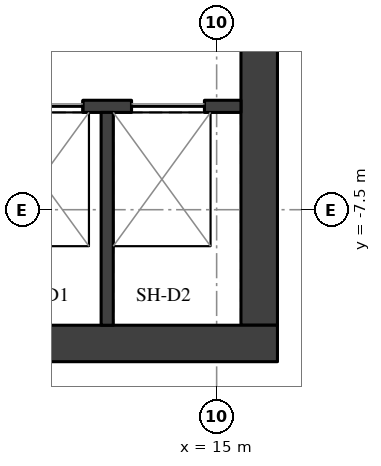
"""IFC4 building model, lengths in metres.
Left out: names, types, materials, properties, quantities, classifications, styles, units other than length and angle.
Written with IfcOpenShell. Run it as: python <this file> out.ifc"""

import sys

from ifc_helpers import new_model, si_unit, direction, frame, frame_2d, origin, place, context, subcontext, project, spatial, rectangle, extrude, element, fill, save


model = new_model("IFC4")
c1 = context("Model", 3, precision=1e-05, world=origin(), true_north=direction((0.0, 1.0)))
c2 = subcontext(c1, "Body", "Model", "MODEL_VIEW")
j1 = project(units=[si_unit("LENGTHUNIT", "METRE"), si_unit("PLANEANGLEUNIT", "RADIAN")], contexts=[c1])
p1 = place(None, origin())
s1 = spatial("IfcSite", under=j1, at=p1, CompositionType="ELEMENT")
p2 = place(p1, origin())
s2 = spatial("IfcBuilding", under=s1, at=p2, CompositionType="ELEMENT")
p3 = place(p2, frame((0.0, 0.0, 264.2)))
s3 = spatial("IfcBuildingStorey", under=s2, at=p3, CompositionType="ELEMENT", Elevation=264.2)
p4 = place(p3, frame((15.7, -9.4, 0.0), z_axis=(0.0, 0.0, 1.0), x_axis=(0.0, 1.0, 0.0)))
e1 = element("IfcWall", 1, at=p4, inside=s3, PredefinedType="SHEAR", context=c2, shape_type="SweptSolid", body=[
    extrude(rectangle(XDim=18.8, YDim=0.6, at=frame_2d((9.4, 0.0))), origin(), (0.0, 0.0, 1.0), 4.59),
])
p5 = place(p3, frame((4.0, -9.7, 0.0), z_axis=(0.0, 0.0, 1.0), x_axis=(1.0, 0.0, 0.0)))
e2 = element("IfcWall", 2, at=p5, inside=s3, PredefinedType="SHEAR", context=c2, shape_type="SweptSolid", body=[
    extrude(rectangle(XDim=12.0, YDim=0.6, at=frame_2d((6.0, 0.0))), origin(), (0.0, 0.0, 1.0), 4.59),
])
p6 = place(p3, frame((4.6, -5.8, 0.0), z_axis=(0.0, 0.0, 1.0), x_axis=(1.0, 0.0, 0.0)))
e3 = element("IfcWall", 3, at=p6, inside=s3, PredefinedType="SHEAR", context=c2, shape_type="SweptSolid", body=[
    extrude(rectangle(XDim=10.8, YDim=0.2, at=frame_2d((5.4, 0.0))), origin(), (0.0, 0.0, 1.0), 4.59),
])
p7 = place(p6, frame((7.0, 0.0, 0.0)))
e4 = element("IfcOpeningElement", 4, at=p7, cuts=e3, PredefinedType="OPENING", context=c2, shape_type="SweptSolid", body=[
    extrude(rectangle(XDim=1.2, YDim=2.1, at=frame_2d((0.6, 1.05))), frame((0.0, 0.11, 0.0), z_axis=(0.0, -1.0, 0.0), x_axis=(1.0, 0.0, 0.0)), (0.0, 0.0, 1.0), 0.22),
])
p8 = place(p6, frame((9.0, 0.0, 0.0)))
e5 = element("IfcOpeningElement", 5, at=p8, cuts=e3, PredefinedType="OPENING", context=c2, shape_type="SweptSolid", body=[
    extrude(rectangle(XDim=1.2, YDim=2.1, at=frame_2d((0.6, 1.05))), frame((0.0, 0.11, 0.0), z_axis=(0.0, -1.0, 0.0), x_axis=(1.0, 0.0, 0.0)), (0.0, 0.0, 1.0), 0.22),
])
p9 = place(p3, frame((13.2, -9.4, 0.0), z_axis=(0.0, 0.0, 1.0), x_axis=(0.0, 1.0, 0.0)))
e6 = element("IfcWall", 6, at=p9, inside=s3, PredefinedType="SHEAR", context=c2, shape_type="SweptSolid", body=[
    extrude(rectangle(XDim=3.5, YDim=0.2, at=frame_2d((1.75, 0.0))), origin(), (0.0, 0.0, 1.0), 4.59),
])
p10 = place(p7, origin())
e7 = element("IfcDoor", 7, at=p10, inside=s3, OperationType="DOUBLE_DOOR_SLIDING", PredefinedType="DOOR", context=c2, shape_type="SweptSolid", body=[
    extrude(rectangle(XDim=1.2, YDim=2.1, at=frame_2d((0.6, 1.05))), frame((0.0, 0.025, 0.0), z_axis=(0.0, -1.0, 0.0), x_axis=(1.0, 0.0, 0.0)), (0.0, 0.0, 1.0), 0.05),
])
fill(e4, e7)
p11 = place(p8, origin())
e8 = element("IfcDoor", 8, at=p11, inside=s3, OperationType="DOUBLE_DOOR_SLIDING", PredefinedType="DOOR", context=c2, shape_type="SweptSolid", body=[
    extrude(rectangle(XDim=1.2, YDim=2.1, at=frame_2d((0.6, 1.05))), frame((0.0, 0.025, 0.0), z_axis=(0.0, -1.0, 0.0), x_axis=(1.0, 0.0, 0.0)), (0.0, 0.0, 1.0), 0.05),
])
fill(e5, e8)
save(model, sys.argv[1])
